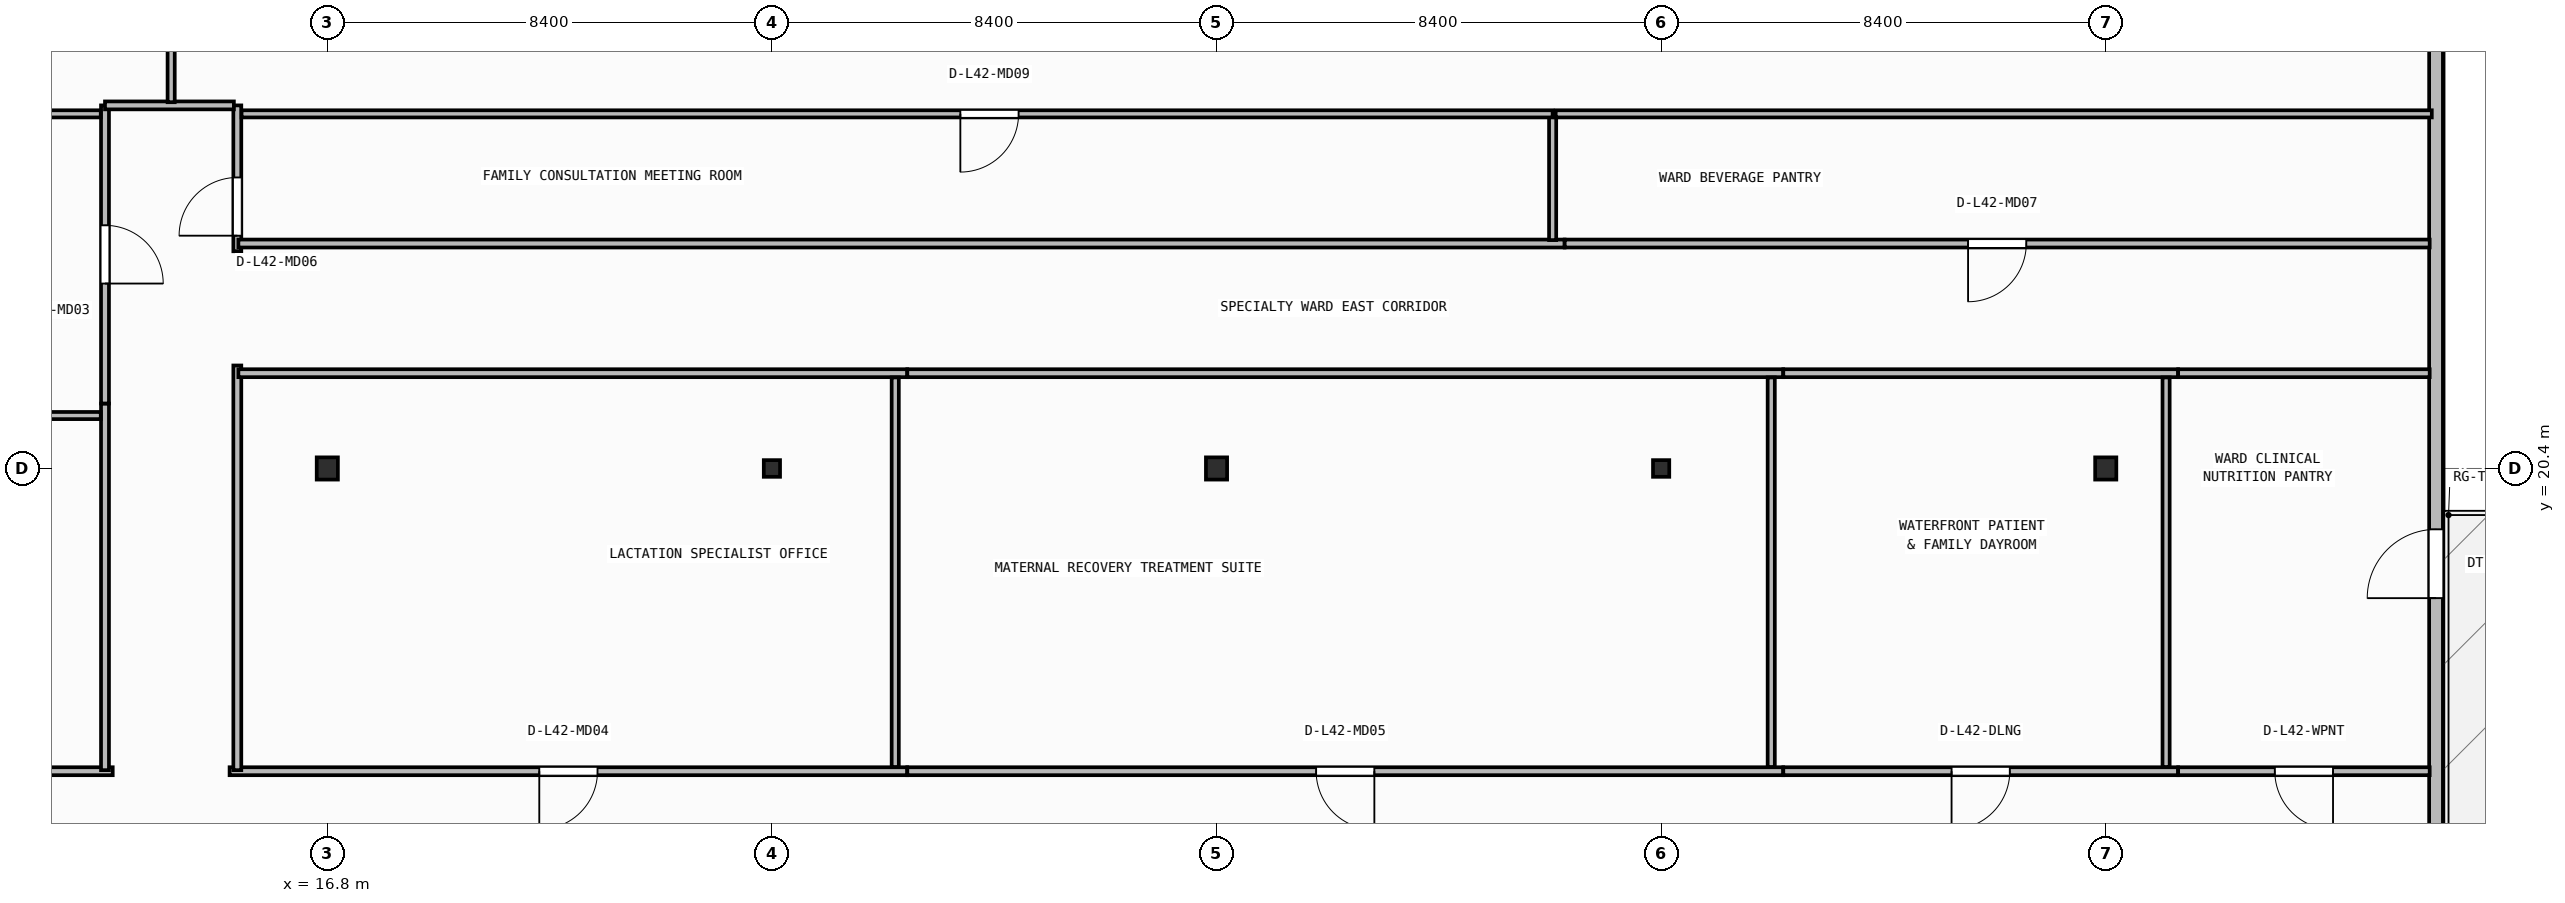
"""IFC4 building model, lengths in metres.
Left out: names, types, materials, properties, quantities, classifications, styles, units other than length and angle.
Written with IfcOpenShell. Run it as: python <this file> out.ifc"""

import sys

from ifc_helpers import new_model, si_unit, direction, frame, frame_2d, origin, origin_2d, place, context, subcontext, project, spatial, rectangle, i_section, extrude, element, fill, save


model = new_model("IFC4")
c1 = context("Model", 3, precision=1e-05, world=origin(), true_north=direction((0.0, 1.0)))
c2 = subcontext(c1, "Body", "Model", "MODEL_VIEW")
j1 = project(units=[si_unit("LENGTHUNIT", "METRE"), si_unit("PLANEANGLEUNIT", "RADIAN")], contexts=[c1])
p1 = place(None, origin())
s1 = spatial("IfcSite", under=j1, at=p1, CompositionType="ELEMENT")
p2 = place(p1, origin())
s2 = spatial("IfcBuilding", under=s1, at=p2, CompositionType="ELEMENT")
p3 = place(p2, frame((0.0, 0.0, 170.5)))
s3 = spatial("IfcBuildingStorey", under=s2, at=p3, CompositionType="ELEMENT", Elevation=170.5)
p4 = place(p3, frame((16.8, 20.4, 0.0), z_axis=(0.0, 0.0, 1.0), x_axis=(1.0, 0.0, 0.0)))
e1 = element("IfcColumn", 1, at=p4, inside=s3, PredefinedType="COLUMN", context=c2, shape_type="SweptSolid", body=[
    extrude(i_section(OverallWidth=0.4, OverallDepth=0.42, WebThickness=0.025, FlangeThickness=0.04, at=origin_2d()), origin(), (0.0, 0.0, 1.0), 3.95),
])
p5 = place(p3, frame((25.2, 20.4, 0.0), z_axis=(0.0, 0.0, 1.0), x_axis=(1.0, 0.0, 0.0)))
e2 = element("IfcColumn", 2, at=p5, inside=s3, PredefinedType="COLUMN", context=c2, shape_type="SweptSolid", body=[
    extrude(i_section(OverallWidth=0.307, OverallDepth=0.315, WebThickness=0.012, FlangeThickness=0.019, FilletRadius=0.017, at=origin_2d()), origin(), (0.0, 0.0, 1.0), 3.95),
])
p6 = place(p3, frame((33.6, 20.4, 0.0), z_axis=(0.0, 0.0, 1.0), x_axis=(1.0, 0.0, 0.0)))
e3 = element("IfcColumn", 3, at=p6, inside=s3, PredefinedType="COLUMN", context=c2, shape_type="SweptSolid", body=[
    extrude(i_section(OverallWidth=0.4, OverallDepth=0.42, WebThickness=0.025, FlangeThickness=0.04, at=origin_2d()), origin(), (0.0, 0.0, 1.0), 3.95),
])
p7 = place(p3, frame((42.0, 20.4, 0.0), z_axis=(0.0, 0.0, 1.0), x_axis=(1.0, 0.0, 0.0)))
e4 = element("IfcColumn", 4, at=p7, inside=s3, PredefinedType="COLUMN", context=c2, shape_type="SweptSolid", body=[
    extrude(i_section(OverallWidth=0.307, OverallDepth=0.315, WebThickness=0.012, FlangeThickness=0.019, FilletRadius=0.017, at=origin_2d()), origin(), (0.0, 0.0, 1.0), 3.95),
])
p8 = place(p3, frame((50.4, 20.4, 0.0), z_axis=(0.0, 0.0, 1.0), x_axis=(1.0, 0.0, 0.0)))
e5 = element("IfcColumn", 5, at=p8, inside=s3, PredefinedType="COLUMN", context=c2, shape_type="SweptSolid", body=[
    extrude(i_section(OverallWidth=0.4, OverallDepth=0.42, WebThickness=0.025, FlangeThickness=0.04, at=origin_2d()), origin(), (0.0, 0.0, 1.0), 3.95),
])
p9 = place(p3, frame((56.64, 6.86, 0.0), z_axis=(0.0, 0.0, 1.0), x_axis=(0.0, 1.0, 0.0)))
e6 = element("IfcWall", 6, at=p9, inside=s3, PredefinedType="STANDARD", context=c2, shape_type="SweptSolid", body=[
    extrude(rectangle(XDim=23.48, YDim=0.26, at=frame_2d((11.74, 0.0))), origin(), (0.0, 0.0, 1.0), 3.67),
])
p10 = place(p9, frame((11.09, 0.0, 0.0)))
e7 = element("IfcOpeningElement", 7, at=p10, cuts=e6, PredefinedType="OPENING", context=c2, shape_type="SweptSolid", body=[
    extrude(rectangle(XDim=1.3, YDim=2.15, at=frame_2d((0.65, 1.075))), frame((0.0, 0.14, 0.0), z_axis=(0.0, -1.0, 0.0), x_axis=(1.0, 0.0, 0.0)), (0.0, 0.0, 1.0), 0.28),
])
p11 = place(p3, frame((12.746, 14.68, 0.0), z_axis=(0.0, 0.0, 1.0), x_axis=(-1.0, 0.0, 0.0)))
e8 = element("IfcWall", 8, at=p11, inside=s3, PredefinedType="PARTITIONING", context=c2, shape_type="SweptSolid", body=[
    extrude(rectangle(XDim=5.654, YDim=0.15, at=frame_2d((2.827, 0.0))), origin(), (0.0, 0.0, 1.0), 3.67),
])
p12 = place(p11, frame((2.277, 0.0, 0.0)))
e9 = element("IfcOpeningElement", 9, at=p12, cuts=e8, PredefinedType="OPENING", context=c2, shape_type="SweptSolid", body=[
    extrude(rectangle(XDim=1.1, YDim=2.1, at=frame_2d((0.55, 1.05))), frame((0.0, 0.085, 0.0), z_axis=(0.0, -1.0, 0.0), x_axis=(1.0, 0.0, 0.0)), (0.0, 0.0, 1.0), 0.17),
])
p13 = place(p3, frame((27.756, 14.68, 0.0), z_axis=(0.0, 0.0, 1.0), x_axis=(-1.0, 0.0, 0.0)))
e10 = element("IfcWall", 10, at=p13, inside=s3, PredefinedType="PARTITIONING", context=c2, shape_type="SweptSolid", body=[
    extrude(rectangle(XDim=12.802, YDim=0.15, at=frame_2d((6.401, 0.0))), origin(), (0.0, 0.0, 1.0), 3.67),
])
p14 = place(p13, frame((5.851, 0.0, 0.0)))
e11 = element("IfcOpeningElement", 11, at=p14, cuts=e10, PredefinedType="OPENING", context=c2, shape_type="SweptSolid", body=[
    extrude(rectangle(XDim=1.1, YDim=2.1, at=frame_2d((0.55, 1.05))), frame((0.0, 0.085, 0.0), z_axis=(0.0, -1.0, 0.0), x_axis=(1.0, 0.0, 0.0)), (0.0, 0.0, 1.0), 0.17),
])
p15 = place(p3, frame((44.306, 14.68, 0.0), z_axis=(0.0, 0.0, 1.0), x_axis=(-1.0, 0.0, 0.0)))
e12 = element("IfcWall", 12, at=p15, inside=s3, PredefinedType="PARTITIONING", context=c2, shape_type="SweptSolid", body=[
    extrude(rectangle(XDim=16.548, YDim=0.15, at=frame_2d((8.274, 0.0))), origin(), (0.0, 0.0, 1.0), 3.67),
])
p16 = place(p15, frame((7.724, 0.0, 0.0)))
e13 = element("IfcOpeningElement", 13, at=p16, cuts=e12, PredefinedType="OPENING", context=c2, shape_type="SweptSolid", body=[
    extrude(rectangle(XDim=1.1, YDim=2.1, at=frame_2d((0.55, 1.05))), frame((0.0, 0.085, 0.0), z_axis=(0.0, -1.0, 0.0), x_axis=(1.0, 0.0, 0.0)), (0.0, 0.0, 1.0), 0.17),
])
p17 = place(p3, frame((51.766, 14.68, 0.0), z_axis=(0.0, 0.0, 1.0), x_axis=(-1.0, 0.0, 0.0)))
e14 = element("IfcWall", 14, at=p17, inside=s3, PredefinedType="PARTITIONING", context=c2, shape_type="SweptSolid", body=[
    extrude(rectangle(XDim=7.458, YDim=0.15, at=frame_2d((3.729, 0.0))), origin(), (0.0, 0.0, 1.0), 3.67),
])
p18 = place(p17, frame((3.179, 0.0, 0.0)))
e15 = element("IfcOpeningElement", 15, at=p18, cuts=e14, PredefinedType="OPENING", context=c2, shape_type="SweptSolid", body=[
    extrude(rectangle(XDim=1.1, YDim=2.1, at=frame_2d((0.55, 1.05))), frame((0.0, 0.085, 0.0), z_axis=(0.0, -1.0, 0.0), x_axis=(1.0, 0.0, 0.0)), (0.0, 0.0, 1.0), 0.17),
])
p19 = place(p3, frame((56.52, 14.68, 0.0), z_axis=(0.0, 0.0, 1.0), x_axis=(-1.0, 0.0, 0.0)))
e16 = element("IfcWall", 16, at=p19, inside=s3, PredefinedType="PARTITIONING", context=c2, shape_type="SweptSolid", body=[
    extrude(rectangle(XDim=4.752, YDim=0.15, at=frame_2d((2.376, 0.0))), origin(), (0.0, 0.0, 1.0), 3.67),
])
p20 = place(p19, frame((1.826, 0.0, 0.0)))
e17 = element("IfcOpeningElement", 17, at=p20, cuts=e16, PredefinedType="OPENING", context=c2, shape_type="SweptSolid", body=[
    extrude(rectangle(XDim=1.1, YDim=2.1, at=frame_2d((0.55, 1.05))), frame((0.0, 0.085, 0.0), z_axis=(0.0, -1.0, 0.0), x_axis=(1.0, 0.0, 0.0)), (0.0, 0.0, 1.0), 0.17),
])
p21 = place(p3, frame((12.6, 21.626, 0.0), z_axis=(0.0, 0.0, 1.0), x_axis=(0.0, -1.0, 0.0)))
e18 = element("IfcWall", 18, at=p21, inside=s3, PredefinedType="PARTITIONING", context=c2, shape_type="SweptSolid", body=[
    extrude(rectangle(XDim=6.926, YDim=0.15, at=frame_2d((3.463, 0.0))), origin(), (0.0, 0.0, 1.0), 3.67),
])
p22 = place(p3, frame((12.6, 27.26, 0.0), z_axis=(0.0, 0.0, 1.0), x_axis=(0.0, -1.0, 0.0)))
e19 = element("IfcWall", 19, at=p22, inside=s3, PredefinedType="PARTITIONING", context=c2, shape_type="SweptSolid", body=[
    extrude(rectangle(XDim=5.632, YDim=0.15, at=frame_2d((2.816, 0.0))), origin(), (0.0, 0.0, 1.0), 3.67),
])
p23 = place(p22, frame((2.266, 0.0, 0.0)))
e20 = element("IfcOpeningElement", 20, at=p23, cuts=e19, PredefinedType="OPENING", context=c2, shape_type="SweptSolid", body=[
    extrude(rectangle(XDim=1.1, YDim=2.1, at=frame_2d((0.55, 1.05))), frame((0.0, 0.085, 0.0), z_axis=(0.0, -1.0, 0.0), x_axis=(1.0, 0.0, 0.0)), (0.0, 0.0, 1.0), 0.17),
])
p24 = place(p3, frame((15.1, 14.7, 0.0), z_axis=(0.0, 0.0, 1.0), x_axis=(0.0, 1.0, 0.0)))
e21 = element("IfcWall", 21, at=p24, inside=s3, PredefinedType="PARTITIONING", context=c2, shape_type="SweptSolid", body=[
    extrude(rectangle(XDim=7.646, YDim=0.15, at=frame_2d((3.823, 0.0))), origin(), (0.0, 0.0, 1.0), 3.67),
])
p25 = place(p3, frame((15.1, 24.504, 0.0), z_axis=(0.0, 0.0, 1.0), x_axis=(0.0, 1.0, 0.0)))
e22 = element("IfcWall", 22, at=p25, inside=s3, PredefinedType="PARTITIONING", context=c2, shape_type="SweptSolid", body=[
    extrude(rectangle(XDim=2.756, YDim=0.15, at=frame_2d((1.378, 0.0))), origin(), (0.0, 0.0, 1.0), 3.67),
])
p26 = place(p25, frame((0.294, 0.0, 0.0)))
e23 = element("IfcOpeningElement", 23, at=p26, cuts=e22, PredefinedType="OPENING", context=c2, shape_type="SweptSolid", body=[
    extrude(rectangle(XDim=1.1, YDim=2.1, at=frame_2d((0.55, 1.05))), frame((0.0, 0.085, 0.0), z_axis=(0.0, -1.0, 0.0), x_axis=(1.0, 0.0, 0.0)), (0.0, 0.0, 1.0), 0.17),
])
p27 = place(p3, frame((15.035, 27.26, 0.0), z_axis=(0.0, 0.0, 1.0), x_axis=(-1.0, 0.0, 0.0)))
e24 = element("IfcWall", 24, at=p27, inside=s3, PredefinedType="PARTITIONING", context=c2, shape_type="SweptSolid", body=[
    extrude(rectangle(XDim=2.435, YDim=0.15, at=frame_2d((1.217, 0.0))), origin(), (0.0, 0.0, 1.0), 3.67),
])
p28 = place(p3, frame((15.12, 22.2, 0.0), z_axis=(0.0, 0.0, 1.0), x_axis=(1.0, 0.0, 0.0)))
e25 = element("IfcWall", 25, at=p28, inside=s3, PredefinedType="PARTITIONING", context=c2, shape_type="SweptSolid", body=[
    extrude(rectangle(XDim=12.636, YDim=0.15, at=frame_2d((6.318, 0.0))), origin(), (0.0, 0.0, 1.0), 3.67),
])
p29 = place(p3, frame((27.758, 22.2, 0.0), z_axis=(0.0, 0.0, 1.0), x_axis=(1.0, 0.0, 0.0)))
e26 = element("IfcWall", 26, at=p29, inside=s3, PredefinedType="PARTITIONING", context=c2, shape_type="SweptSolid", body=[
    extrude(rectangle(XDim=16.548, YDim=0.15, at=frame_2d((8.274, 0.0))), origin(), (0.0, 0.0, 1.0), 3.67),
])
p30 = place(p3, frame((44.308, 22.2, 0.0), z_axis=(0.0, 0.0, 1.0), x_axis=(1.0, 0.0, 0.0)))
e27 = element("IfcWall", 27, at=p30, inside=s3, PredefinedType="PARTITIONING", context=c2, shape_type="SweptSolid", body=[
    extrude(rectangle(XDim=7.458, YDim=0.15, at=frame_2d((3.729, 0.0))), origin(), (0.0, 0.0, 1.0), 3.67),
])
p31 = place(p3, frame((51.768, 22.2, 0.0), z_axis=(0.0, 0.0, 1.0), x_axis=(1.0, 0.0, 0.0)))
e28 = element("IfcWall", 28, at=p31, inside=s3, PredefinedType="PARTITIONING", context=c2, shape_type="SweptSolid", body=[
    extrude(rectangle(XDim=4.752, YDim=0.15, at=frame_2d((2.376, 0.0))), origin(), (0.0, 0.0, 1.0), 3.67),
])
p32 = place(p3, frame((40.176, 24.65, 0.0), z_axis=(0.0, 0.0, 1.0), x_axis=(-1.0, 0.0, 0.0)))
e29 = element("IfcWall", 29, at=p32, inside=s3, PredefinedType="PARTITIONING", context=c2, shape_type="SweptSolid", body=[
    extrude(rectangle(XDim=25.056, YDim=0.15, at=frame_2d((12.528, 0.0))), origin(), (0.0, 0.0, 1.0), 3.289),
])
p33 = place(p3, frame((56.52, 24.65, 0.0), z_axis=(0.0, 0.0, 1.0), x_axis=(-1.0, 0.0, 0.0)))
e30 = element("IfcWall", 30, at=p33, inside=s3, PredefinedType="PARTITIONING", context=c2, shape_type="SweptSolid", body=[
    extrude(rectangle(XDim=16.342, YDim=0.15, at=frame_2d((8.171, 0.0))), origin(), (0.0, 0.0, 1.0), 3.289),
])
p34 = place(p33, frame((7.621, 0.0, 0.0)))
e31 = element("IfcOpeningElement", 31, at=p34, cuts=e30, PredefinedType="OPENING", context=c2, shape_type="SweptSolid", body=[
    extrude(rectangle(XDim=1.1, YDim=2.1, at=frame_2d((0.55, 1.05))), frame((0.0, 0.085, 0.0), z_axis=(0.0, -1.0, 0.0), x_axis=(1.0, 0.0, 0.0)), (0.0, 0.0, 1.0), 0.17),
])
p35 = place(p3, frame((12.52, 21.4, 0.0), z_axis=(0.0, 0.0, 1.0), x_axis=(-1.0, 0.0, 0.0)))
e32 = element("IfcWall", 32, at=p35, inside=s3, PredefinedType="PARTITIONING", context=c2, shape_type="SweptSolid", body=[
    extrude(rectangle(XDim=7.062, YDim=0.135, at=frame_2d((3.531, 0.0))), origin(), (0.0, 0.0, 1.0), 3.67),
])
p36 = place(p3, frame((12.52, 27.1, 0.0), z_axis=(0.0, 0.0, 1.0), x_axis=(-1.0, 0.0, 0.0)))
e33 = element("IfcWall", 33, at=p36, inside=s3, PredefinedType="PARTITIONING", context=c2, shape_type="SweptSolid", body=[
    extrude(rectangle(XDim=12.28, YDim=0.135, at=frame_2d((6.14, 0.0))), origin(), (0.0, 0.0, 1.0), 3.67),
])
p37 = place(p36, frame((7.207, 0.0, 0.0)))
e34 = element("IfcOpeningElement", 34, at=p37, cuts=e33, PredefinedType="OPENING", context=c2, shape_type="SweptSolid", body=[
    extrude(rectangle(XDim=1.1, YDim=2.1, at=frame_2d((0.55, 1.05))), frame((0.0, 0.077, 0.0), z_axis=(0.0, -1.0, 0.0), x_axis=(1.0, 0.0, 0.0)), (0.0, 0.0, 1.0), 0.155),
])
for number, where, z_axis, x_axis in (
    (35, (27.53, 14.76, 0.0), (0.0, 0.0, 1.0), (0.0, 1.0, 0.0)),
    (36, (44.08, 14.76, 0.0), (0.0, 0.0, 1.0), (0.0, 1.0, 0.0)),
    (37, (51.54, 14.76, 0.0), (0.0, 0.0, 1.0), (0.0, 1.0, 0.0)),
):
    element("IfcWall", number, at=place(p3, frame(where, z_axis=z_axis, x_axis=x_axis)), inside=s3, PredefinedType="PARTITIONING", context=c2, shape_type="SweptSolid", body=[
        extrude(rectangle(XDim=7.36, YDim=0.135, at=frame_2d((3.68, 0.0))), origin(), (0.0, 0.0, 1.0), 3.67),
    ])
p38 = place(p3, frame((39.95, 24.715, 0.0), z_axis=(0.0, 0.0, 1.0), x_axis=(0.0, 1.0, 0.0)))
e38 = element("IfcWall", 38, at=p38, inside=s3, PredefinedType="PARTITIONING", context=c2, shape_type="SweptSolid", body=[
    extrude(rectangle(XDim=2.385, YDim=0.135, at=frame_2d((1.192, 0.0))), origin(), (0.0, 0.0, 1.0), 3.67),
])
p39 = place(p3, frame((39.95, 27.1, 0.0), z_axis=(0.0, 0.0, 1.0), x_axis=(-1.0, 0.0, 0.0)))
e39 = element("IfcWall", 39, at=p39, inside=s3, PredefinedType="PARTITIONING", context=c2, shape_type="SweptSolid", body=[
    extrude(rectangle(XDim=24.77, YDim=0.135, at=frame_2d((12.385, 0.0))), origin(), (0.0, 0.0, 1.0), 3.67),
])
p40 = place(p39, frame((10.09, 0.0, 0.0)))
e40 = element("IfcOpeningElement", 40, at=p40, cuts=e39, PredefinedType="OPENING", context=c2, shape_type="SweptSolid", body=[
    extrude(rectangle(XDim=1.1, YDim=2.1, at=frame_2d((0.55, 1.05))), frame((0.0, 0.077, 0.0), z_axis=(0.0, -1.0, 0.0), x_axis=(1.0, 0.0, 0.0)), (0.0, 0.0, 1.0), 0.155),
])
p41 = place(p3, frame((56.56, 27.1, 0.0), z_axis=(0.0, 0.0, 1.0), x_axis=(-1.0, 0.0, 0.0)))
e41 = element("IfcWall", 41, at=p41, inside=s3, PredefinedType="PARTITIONING", context=c2, shape_type="SweptSolid", body=[
    extrude(rectangle(XDim=16.552, YDim=0.135, at=frame_2d((8.276, 0.0))), origin(), (0.0, 0.0, 1.0), 3.67),
])
p42 = place(p3, frame((13.85, 27.32, 0.0), z_axis=(0.0, 0.0, 1.0), x_axis=(0.0, 1.0, 0.0)))
e42 = element("IfcWall", 42, at=p42, inside=s3, PredefinedType="PARTITIONING", context=c2, shape_type="SweptSolid", body=[
    extrude(rectangle(XDim=8.96, YDim=0.135, at=frame_2d((4.48, 0.0))), origin(), (0.0, 0.0, 1.0), 3.67),
])
p43 = place(p10, origin())
e43 = element("IfcDoor", 43, at=p43, inside=s3, OperationType="SINGLE_SWING_LEFT", PredefinedType="DOOR", context=c2, shape_type="SweptSolid", body=[
    extrude(rectangle(XDim=1.3, YDim=2.15, at=frame_2d((0.65, 1.075))), frame((0.0, 0.025, 0.0), z_axis=(0.0, -1.0, 0.0), x_axis=(1.0, 0.0, 0.0)), (0.0, 0.0, 1.0), 0.05),
])
fill(e7, e43)
p44 = place(p14, origin())
e44 = element("IfcDoor", 44, at=p44, inside=s3, OperationType="SINGLE_SWING_RIGHT", PredefinedType="DOOR", context=c2, shape_type="SweptSolid", body=[
    extrude(rectangle(XDim=1.1, YDim=2.1, at=frame_2d((0.55, 1.05))), frame((0.0, 0.025, 0.0), z_axis=(0.0, -1.0, 0.0), x_axis=(1.0, 0.0, 0.0)), (0.0, 0.0, 1.0), 0.05),
])
fill(e11, e44)
p45 = place(p16, origin())
e45 = element("IfcDoor", 45, at=p45, inside=s3, OperationType="SINGLE_SWING_LEFT", PredefinedType="DOOR", context=c2, shape_type="SweptSolid", body=[
    extrude(rectangle(XDim=1.1, YDim=2.1, at=frame_2d((0.55, 1.05))), frame((0.0, 0.025, 0.0), z_axis=(0.0, -1.0, 0.0), x_axis=(1.0, 0.0, 0.0)), (0.0, 0.0, 1.0), 0.05),
])
fill(e13, e45)
p46 = place(p18, origin())
e46 = element("IfcDoor", 46, at=p46, inside=s3, OperationType="SINGLE_SWING_RIGHT", PredefinedType="DOOR", context=c2, shape_type="SweptSolid", body=[
    extrude(rectangle(XDim=1.1, YDim=2.1, at=frame_2d((0.55, 1.05))), frame((0.0, 0.025, 0.0), z_axis=(0.0, -1.0, 0.0), x_axis=(1.0, 0.0, 0.0)), (0.0, 0.0, 1.0), 0.05),
])
fill(e15, e46)
p47 = place(p20, origin())
e47 = element("IfcDoor", 47, at=p47, inside=s3, OperationType="SINGLE_SWING_LEFT", PredefinedType="DOOR", context=c2, shape_type="SweptSolid", body=[
    extrude(rectangle(XDim=1.1, YDim=2.1, at=frame_2d((0.55, 1.05))), frame((0.0, 0.025, 0.0), z_axis=(0.0, -1.0, 0.0), x_axis=(1.0, 0.0, 0.0)), (0.0, 0.0, 1.0), 0.05),
])
fill(e17, e47)
p48 = place(p23, origin())
e48 = element("IfcDoor", 48, at=p48, inside=s3, OperationType="SINGLE_SWING_RIGHT", PredefinedType="DOOR", context=c2, shape_type="SweptSolid", body=[
    extrude(rectangle(XDim=1.1, YDim=2.1, at=frame_2d((0.55, 1.05))), frame((0.0, 0.025, 0.0), z_axis=(0.0, -1.0, 0.0), x_axis=(1.0, 0.0, 0.0)), (0.0, 0.0, 1.0), 0.05),
])
fill(e20, e48)
p49 = place(p26, origin())
e49 = element("IfcDoor", 49, at=p49, inside=s3, OperationType="SINGLE_SWING_LEFT", PredefinedType="DOOR", context=c2, shape_type="SweptSolid", body=[
    extrude(rectangle(XDim=1.1, YDim=2.1, at=frame_2d((0.55, 1.05))), frame((0.0, 0.025, 0.0), z_axis=(0.0, -1.0, 0.0), x_axis=(1.0, 0.0, 0.0)), (0.0, 0.0, 1.0), 0.05),
])
fill(e23, e49)
p50 = place(p34, origin())
e50 = element("IfcDoor", 50, at=p50, inside=s3, OperationType="SINGLE_SWING_RIGHT", PredefinedType="DOOR", context=c2, shape_type="SweptSolid", body=[
    extrude(rectangle(XDim=1.1, YDim=2.1, at=frame_2d((0.55, 1.05))), frame((0.0, 0.025, 0.0), z_axis=(0.0, -1.0, 0.0), x_axis=(1.0, 0.0, 0.0)), (0.0, 0.0, 1.0), 0.05),
])
fill(e31, e50)
p51 = place(p40, origin())
e51 = element("IfcDoor", 51, at=p51, inside=s3, OperationType="SINGLE_SWING_RIGHT", PredefinedType="DOOR", context=c2, shape_type="SweptSolid", body=[
    extrude(rectangle(XDim=1.1, YDim=2.1, at=frame_2d((0.55, 1.05))), frame((0.0, 0.025, 0.0), z_axis=(0.0, -1.0, 0.0), x_axis=(1.0, 0.0, 0.0)), (0.0, 0.0, 1.0), 0.05),
])
fill(e40, e51)
save(model, sys.argv[1])
